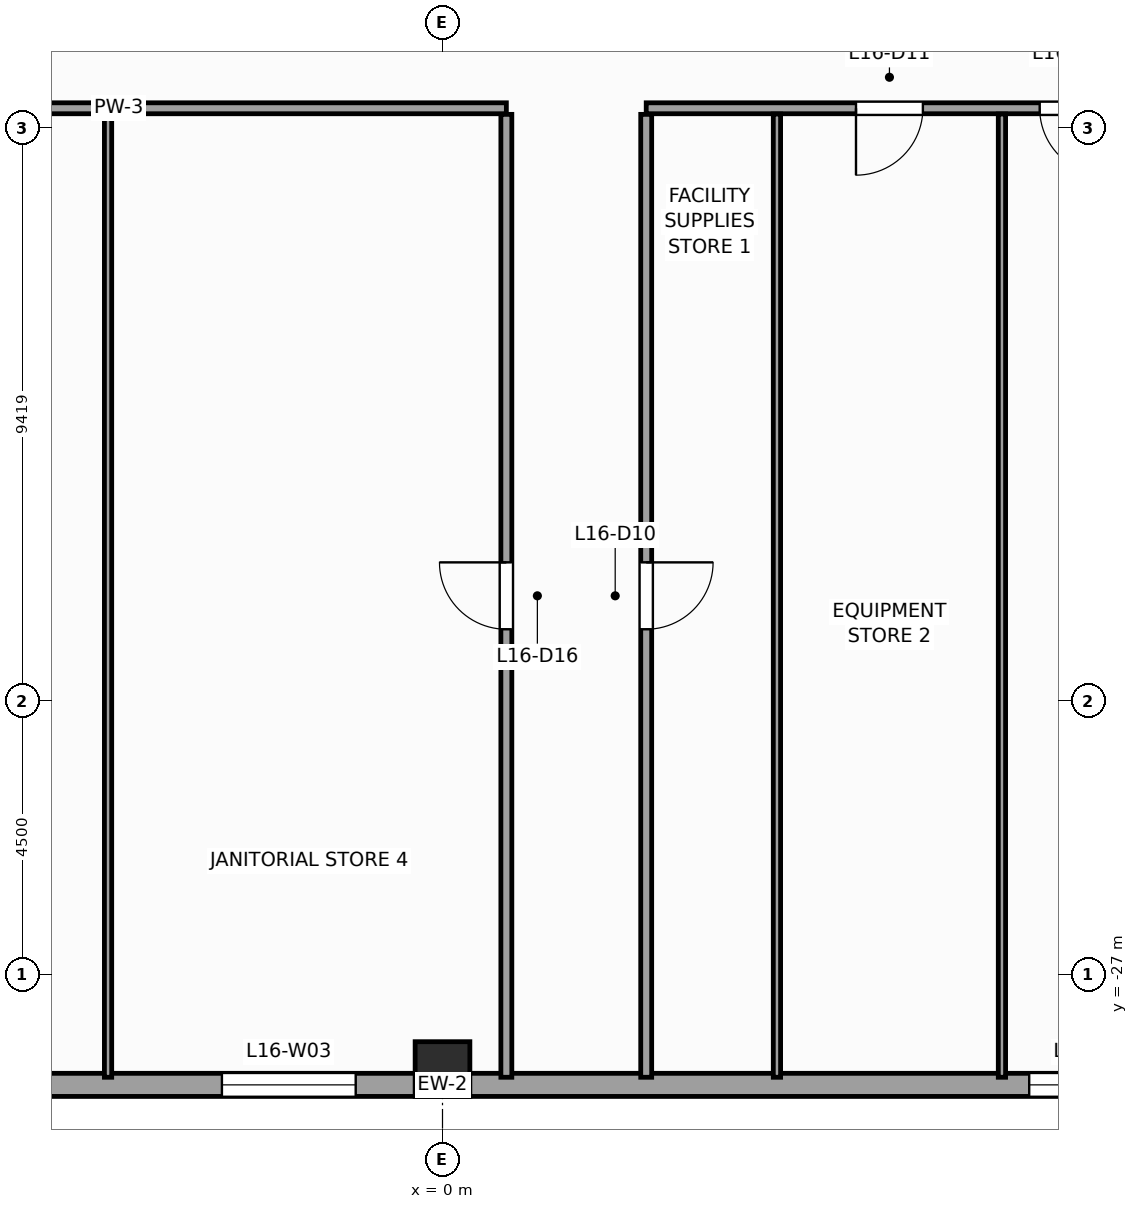
"""IFC4 building model, lengths in metres.
Left out: names, types, materials, properties, quantities, classifications, styles, units other than length and angle.
Written with IfcOpenShell. Run it as: python <this file> out.ifc"""

import sys

from ifc_helpers import new_model, si_unit, direction, frame, frame_2d, origin, origin_2d, place, context, subcontext, project, spatial, rectangle, extrude, source, transform, mapped, element, fill, save


model = new_model("IFC4")
c1 = context("Model", 3, precision=1e-05, world=origin(), true_north=direction((0.0, 1.0)))
c2 = subcontext(c1, "Body", "Model", "MODEL_VIEW")
j1 = project(units=[si_unit("LENGTHUNIT", "METRE"), si_unit("PLANEANGLEUNIT", "RADIAN")], contexts=[c1])
p1 = place(None, origin())
s1 = spatial("IfcSite", under=j1, at=p1, CompositionType="ELEMENT")
p2 = place(p1, origin())
s2 = spatial("IfcBuilding", under=s1, at=p2, CompositionType="ELEMENT")
p3 = place(p2, frame((0.0, 0.0, 70.0)))
s3 = spatial("IfcBuildingStorey", under=s2, at=p3, CompositionType="ELEMENT", Elevation=70.0)
m1 = source(origin(), c2, "Body", "SweptSolid", [
    extrude(rectangle(XDim=0.9, YDim=0.9, at=origin_2d()), origin(), (0.0, 0.0, 1.0), 4.0),
])
p4 = place(p3, frame((0.0, -28.55, 0.0), z_axis=(0.0, 0.0, 1.0), x_axis=(1.0, 0.0, 0.0)))
e1 = element("IfcColumn", 1, at=p4, inside=s3, PredefinedType="COLUMN", context=c2, shape_type="MappedRepresentation", body=[
    mapped(m1, transform((0.0, 0.0, 0.0), scale=1.0)),
])
p5 = place(p3, frame((-25.69, -28.81, 0.0), z_axis=(0.0, 0.0, 1.0), x_axis=(1.0, 0.0, 0.0)))
e2 = element("IfcWall", 2, at=p5, inside=s3, PredefinedType="STANDARD", context=c2, shape_type="SweptSolid", body=[
    extrude(rectangle(XDim=51.38, YDim=0.38, at=frame_2d((25.69, 0.0))), origin(), (0.0, 0.0, 1.0), 3.12),
])
p6 = place(p5, frame((5.466, 0.0, 0.49)))
e3 = element("IfcOpeningElement", 3, at=p6, cuts=e2, PredefinedType="OPENING", context=c2, shape_type="SweptSolid", body=[
    extrude(rectangle(XDim=1.4, YDim=2.4, at=frame_2d((0.7, 1.2))), frame((0.0, 0.2, 0.0), z_axis=(0.0, -1.0, 0.0), x_axis=(1.0, 0.0, 0.0)), (0.0, 0.0, 1.0), 0.4),
])
p7 = place(p5, frame((13.8, 0.0, 0.49)))
e4 = element("IfcOpeningElement", 4, at=p7, cuts=e2, PredefinedType="OPENING", context=c2, shape_type="SweptSolid", body=[
    extrude(rectangle(XDim=2.2, YDim=2.4, at=frame_2d((1.1, 1.2))), frame((0.0, 0.2, 0.0), z_axis=(0.0, -1.0, 0.0), x_axis=(1.0, 0.0, 0.0)), (0.0, 0.0, 1.0), 0.4),
])
p8 = place(p5, frame((22.062, 0.0, 0.49)))
e5 = element("IfcOpeningElement", 5, at=p8, cuts=e2, PredefinedType="OPENING", context=c2, shape_type="SweptSolid", body=[
    extrude(rectangle(XDim=2.2, YDim=2.4, at=frame_2d((1.1, 1.2))), frame((0.0, 0.2, 0.0), z_axis=(0.0, -1.0, 0.0), x_axis=(1.0, 0.0, 0.0)), (0.0, 0.0, 1.0), 0.4),
])
p9 = place(p5, frame((35.338, 0.0, 0.49)))
e6 = element("IfcOpeningElement", 6, at=p9, cuts=e2, PredefinedType="OPENING", context=c2, shape_type="SweptSolid", body=[
    extrude(rectangle(XDim=2.2, YDim=2.4, at=frame_2d((1.1, 1.2))), frame((0.0, 0.2, 0.0), z_axis=(0.0, -1.0, 0.0), x_axis=(1.0, 0.0, 0.0)), (0.0, 0.0, 1.0), 0.4),
])
p10 = place(p5, frame((43.487, 0.0, 0.49)))
e7 = element("IfcOpeningElement", 7, at=p10, cuts=e2, PredefinedType="OPENING", context=c2, shape_type="SweptSolid", body=[
    extrude(rectangle(XDim=1.4, YDim=2.4, at=frame_2d((0.7, 1.2))), frame((0.0, 0.2, 0.0), z_axis=(0.0, -1.0, 0.0), x_axis=(1.0, 0.0, 0.0)), (0.0, 0.0, 1.0), 0.4),
])
p11 = place(p3, frame((-11.7, -12.75, 0.0), z_axis=(0.0, 0.0, 1.0), x_axis=(1.0, 0.0, 0.0)))
e8 = element("IfcWall", 8, at=p11, inside=s3, PredefinedType="PARTITIONING", context=c2, shape_type="SweptSolid", body=[
    extrude(rectangle(XDim=12.75, YDim=0.18, at=frame_2d((6.375, 0.0))), origin(), (0.0, 0.0, 1.0), 3.72),
])
p12 = place(p3, frame((3.35, -12.75, 0.0), z_axis=(0.0, 0.0, 1.0), x_axis=(1.0, 0.0, 0.0)))
e9 = element("IfcWall", 9, at=p12, inside=s3, PredefinedType="PARTITIONING", context=c2, shape_type="SweptSolid", body=[
    extrude(rectangle(XDim=9.4, YDim=0.18, at=frame_2d((4.7, 0.0))), origin(), (0.0, 0.0, 1.0), 3.72),
])
p13 = place(p12, frame((3.45, 0.0, 0.0)))
e10 = element("IfcOpeningElement", 10, at=p13, cuts=e9, PredefinedType="OPENING", context=c2, shape_type="SweptSolid", body=[
    extrude(rectangle(XDim=1.1, YDim=2.2, at=frame_2d((0.55, 1.1))), frame((0.0, 0.1, 0.0), z_axis=(0.0, -1.0, 0.0), x_axis=(1.0, 0.0, 0.0)), (0.0, 0.0, 1.0), 0.2),
])
p14 = place(p12, frame((6.47, 0.0, 0.0)))
e11 = element("IfcOpeningElement", 11, at=p14, cuts=e9, PredefinedType="OPENING", context=c2, shape_type="SweptSolid", body=[
    extrude(rectangle(XDim=1.1, YDim=2.2, at=frame_2d((0.55, 1.1))), frame((0.0, 0.1, 0.0), z_axis=(0.0, -1.0, 0.0), x_axis=(1.0, 0.0, 0.0)), (0.0, 0.0, 1.0), 0.2),
])
p15 = place(p3, frame((1.05, -28.685, 0.0), z_axis=(0.0, 0.0, 1.0), x_axis=(0.0, 1.0, 0.0)))
e12 = element("IfcWall", 12, at=p15, inside=s3, PredefinedType="PARTITIONING", context=c2, shape_type="SweptSolid", body=[
    extrude(rectangle(XDim=15.835, YDim=0.18, at=frame_2d((7.917, 0.0))), origin(), (0.0, 0.0, 1.0), 3.72),
])
p16 = place(p15, frame((7.367, 0.0, 0.0)))
e13 = element("IfcOpeningElement", 13, at=p16, cuts=e12, PredefinedType="OPENING", context=c2, shape_type="SweptSolid", body=[
    extrude(rectangle(XDim=1.1, YDim=2.2, at=frame_2d((0.55, 1.1))), frame((0.0, 0.1, 0.0), z_axis=(0.0, -1.0, 0.0), x_axis=(1.0, 0.0, 0.0)), (0.0, 0.0, 1.0), 0.2),
])
p17 = place(p3, frame((3.35, -28.685, 0.0), z_axis=(0.0, 0.0, 1.0), x_axis=(0.0, 1.0, 0.0)))
e14 = element("IfcWall", 14, at=p17, inside=s3, PredefinedType="PARTITIONING", context=c2, shape_type="SweptSolid", body=[
    extrude(rectangle(XDim=15.835, YDim=0.18, at=frame_2d((7.917, 0.0))), origin(), (0.0, 0.0, 1.0), 3.72),
])
p18 = place(p17, frame((7.367, 0.0, 0.0)))
e15 = element("IfcOpeningElement", 15, at=p18, cuts=e14, PredefinedType="OPENING", context=c2, shape_type="SweptSolid", body=[
    extrude(rectangle(XDim=1.1, YDim=2.2, at=frame_2d((0.55, 1.1))), frame((0.0, 0.1, 0.0), z_axis=(0.0, -1.0, 0.0), x_axis=(1.0, 0.0, 0.0)), (0.0, 0.0, 1.0), 0.2),
])
for number, where, z_axis, x_axis in (
    (16, (5.5, -28.685, 0.0), (0.0, 0.0, 1.0), (0.0, 1.0, 0.0)),
    (17, (9.2, -28.685, 0.0), (0.0, 0.0, 1.0), (0.0, 1.0, 0.0)),
    (18, (-5.5, -28.685, 0.0), (0.0, 0.0, 1.0), (0.0, 1.0, 0.0)),
):
    element("IfcWall", number, at=place(p3, frame(where, z_axis=z_axis, x_axis=x_axis)), inside=s3, PredefinedType="PARTITIONING", context=c2, shape_type="SweptSolid", body=[
        extrude(rectangle(XDim=15.84, YDim=0.12, at=frame_2d((7.92, 0.0))), origin(), (0.0, 0.0, 1.0), 3.72),
    ])
m2 = source(origin(), c2, "Body", "SweptSolid", [
    extrude(rectangle(XDim=2.2, YDim=2.4, at=frame_2d((1.1, 1.2))), frame((0.0, 0.03, 0.0), z_axis=(0.0, -1.0, 0.0), x_axis=(1.0, 0.0, 0.0)), (0.0, 0.0, 1.0), 0.06),
])
p19 = place(p8, origin())
e19 = element("IfcWindow", 19, at=p19, inside=s3, PartitioningType="SINGLE_PANEL", PredefinedType="WINDOW", context=c2, shape_type="MappedRepresentation", body=[
    mapped(m2, transform((0.0, 0.0, 0.0), scale=1.0)),
])
fill(e5, e19)
p20 = place(p9, origin())
e20 = element("IfcWindow", 20, at=p20, inside=s3, PartitioningType="SINGLE_PANEL", PredefinedType="WINDOW", context=c2, shape_type="MappedRepresentation", body=[
    mapped(m2, transform((0.0, 0.0, 0.0), scale=1.0)),
])
fill(e6, e20)
m3 = source(origin(), c2, "Body", "SweptSolid", [
    extrude(rectangle(XDim=1.1, YDim=2.2, at=frame_2d((0.55, 1.1))), frame((0.0, 0.025, 0.0), z_axis=(0.0, -1.0, 0.0), x_axis=(1.0, 0.0, 0.0)), (0.0, 0.0, 1.0), 0.05),
])
p21 = place(p18, frame((1.1, 0.0, 0.0), z_axis=(0.0, 0.0, 1.0), x_axis=(-1.0, 0.0, 0.0)))
e21 = element("IfcDoor", 21, at=p21, inside=s3, OperationType="SINGLE_SWING_RIGHT", PredefinedType="DOOR", context=c2, shape_type="MappedRepresentation", body=[
    mapped(m3, transform((0.0, 0.0, 0.0), scale=1.0)),
])
fill(e15, e21)
p22 = place(p13, frame((1.1, 0.0, 0.0), z_axis=(0.0, 0.0, 1.0), x_axis=(-1.0, 0.0, 0.0)))
e22 = element("IfcDoor", 22, at=p22, inside=s3, OperationType="SINGLE_SWING_LEFT", PredefinedType="DOOR", context=c2, shape_type="MappedRepresentation", body=[
    mapped(m3, transform((0.0, 0.0, 0.0), scale=1.0)),
])
fill(e10, e22)
p23 = place(p14, frame((1.1, 0.0, 0.0), z_axis=(0.0, 0.0, 1.0), x_axis=(-1.0, 0.0, 0.0)))
e23 = element("IfcDoor", 23, at=p23, inside=s3, OperationType="SINGLE_SWING_RIGHT", PredefinedType="DOOR", context=c2, shape_type="MappedRepresentation", body=[
    mapped(m3, transform((0.0, 0.0, 0.0), scale=1.0)),
])
fill(e11, e23)
p24 = place(p16, origin())
e24 = element("IfcDoor", 24, at=p24, inside=s3, OperationType="SINGLE_SWING_RIGHT", PredefinedType="DOOR", context=c2, shape_type="MappedRepresentation", body=[
    mapped(m3, transform((0.0, 0.0, 0.0), scale=1.0)),
])
fill(e13, e24)
save(model, sys.argv[1])
